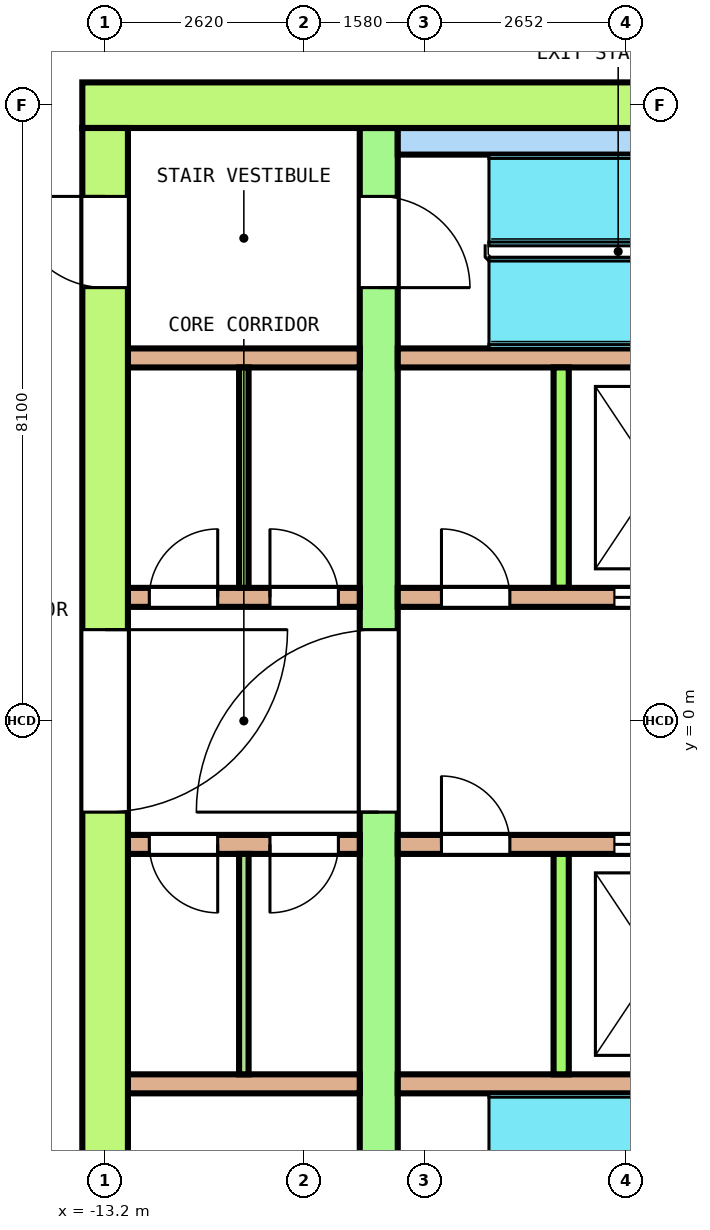
"""IFC4 building model, lengths in metres.
Left out: names, types, materials, properties, quantities, classifications, styles, units other than length and angle.
Written with IfcOpenShell. Run it as: python <this file> out.ifc"""

import sys

from ifc_helpers import new_model, si_unit, direction, frame, frame_2d, origin, place, context, subcontext, project, spatial, polyline, rectangle, outline, extrude, element, fill, save


model = new_model("IFC4")
c1 = context("Model", 3, precision=1e-05, world=origin(), true_north=direction((0.0, 1.0)))
c2 = subcontext(c1, "Body", "Model", "MODEL_VIEW")
j1 = project(units=[si_unit("LENGTHUNIT", "METRE"), si_unit("PLANEANGLEUNIT", "RADIAN")], contexts=[c1])
p1 = place(None, origin())
s1 = spatial("IfcSite", under=j1, at=p1, CompositionType="ELEMENT")
p2 = place(p1, origin())
s2 = spatial("IfcBuilding", under=s1, at=p2, CompositionType="ELEMENT")
p3 = place(p2, frame((0.0, 0.0, 227.4)))
s3 = spatial("IfcBuildingStorey", under=s2, at=p3, CompositionType="ELEMENT", Elevation=227.4)
p4 = place(p3, frame((-23.225, -2.573, 0.0), z_axis=(0.0, 0.0, 1.0), x_axis=(0.499986710104, -0.866033076574, 0.0)))
e1 = element("IfcWall", 1, at=p4, inside=s3, PredefinedType="SOLIDWALL", context=c2, shape_type="SweptSolid", body=[
    extrude(outline(polyline([(-0.027, -0.1), (1.019, -0.1), (2.064, -0.1), (3.11, -0.1), (4.156, -0.1), (5.201, -0.1), (6.247, -0.1), (7.292, -0.1), (8.338, -0.1), (9.384, -0.1), (10.429, -0.1), (11.475, -0.1), (12.52, -0.1), (13.566, -0.1), (14.612, -0.1), (15.657, -0.1), (16.703, -0.1), (17.748, -0.1), (18.794, -0.1), (18.74, 0.1), (17.701, 0.1), (16.661, 0.1), (15.621, 0.1), (14.582, 0.1), (13.542, 0.1), (12.502, 0.1), (11.463, 0.1), (10.423, 0.1), (9.384, 0.1), (8.344, 0.1), (7.304, 0.1), (6.265, 0.1), (5.225, 0.1), (4.185, 0.1), (3.146, 0.1), (2.106, 0.1), (1.066, 0.1), (0.027, 0.1), (-0.027, -0.1)])), origin(), (0.0, 0.0, 1.0), 3.7),
])
p5 = place(p4, frame((0.427, 0.0, 0.1)))
e2 = element("IfcOpeningElement", 2, at=p5, cuts=e1, PredefinedType="OPENING", context=c2, shape_type="SweptSolid", body=[
    extrude(rectangle(XDim=2.9, YDim=2.65, at=frame_2d((1.45, 1.325))), frame((0.0, 0.11, 0.0), z_axis=(0.0, -1.0, 0.0), x_axis=(1.0, 0.0, 0.0)), (0.0, 0.0, 1.0), 0.22),
])
p6 = place(p4, frame((4.18, 0.0, 0.1)))
e3 = element("IfcOpeningElement", 3, at=p6, cuts=e1, PredefinedType="OPENING", context=c2, shape_type="SweptSolid", body=[
    extrude(rectangle(XDim=2.9, YDim=2.65, at=frame_2d((1.45, 1.325))), frame((0.0, 0.11, 0.0), z_axis=(0.0, -1.0, 0.0), x_axis=(1.0, 0.0, 0.0)), (0.0, 0.0, 1.0), 0.22),
])
p7 = place(p4, frame((8.483, 0.0, 0.0)))
e4 = element("IfcOpeningElement", 4, at=p7, cuts=e1, PredefinedType="OPENING", context=c2, shape_type="SweptSolid", body=[
    extrude(rectangle(XDim=1.8, YDim=2.4, at=frame_2d((0.9, 1.2))), frame((0.0, 0.11, 0.0), z_axis=(0.0, -1.0, 0.0), x_axis=(1.0, 0.0, 0.0)), (0.0, 0.0, 1.0), 0.22),
])
p8 = place(p4, frame((8.483, 0.0, 2.55)))
e5 = element("IfcOpeningElement", 5, at=p8, cuts=e1, PredefinedType="OPENING", context=c2, shape_type="SweptSolid", body=[
    extrude(rectangle(XDim=1.8, YDim=0.2, at=frame_2d((0.9, 0.1))), frame((0.0, 0.11, 0.0), z_axis=(0.0, -1.0, 0.0), x_axis=(1.0, 0.0, 0.0)), (0.0, 0.0, 1.0), 0.22),
])
p9 = place(p4, frame((11.687, 0.0, 0.1)))
e6 = element("IfcOpeningElement", 6, at=p9, cuts=e1, PredefinedType="OPENING", context=c2, shape_type="SweptSolid", body=[
    extrude(rectangle(XDim=2.9, YDim=2.65, at=frame_2d((1.45, 1.325))), frame((0.0, 0.11, 0.0), z_axis=(0.0, -1.0, 0.0), x_axis=(1.0, 0.0, 0.0)), (0.0, 0.0, 1.0), 0.22),
])
p10 = place(p4, frame((15.44, 0.0, 0.1)))
e7 = element("IfcOpeningElement", 7, at=p10, cuts=e1, PredefinedType="OPENING", context=c2, shape_type="SweptSolid", body=[
    extrude(rectangle(XDim=2.9, YDim=2.65, at=frame_2d((1.45, 1.325))), frame((0.0, 0.11, 0.0), z_axis=(0.0, -1.0, 0.0), x_axis=(1.0, 0.0, 0.0)), (0.0, 0.0, 1.0), 0.22),
])
p11 = place(p3, frame((-13.5, 8.1, 0.0), z_axis=(0.0, 0.0, 1.0), x_axis=(1.0, 0.0, 0.0)))
e8 = element("IfcWall", 8, at=p11, inside=s3, PredefinedType="SHEAR", context=c2, shape_type="SweptSolid", body=[
    extrude(rectangle(XDim=27.0, YDim=0.6, at=frame_2d((13.5, 0.0))), origin(), (0.0, 0.0, 1.0), 3.7),
])
p12 = place(p11, frame((14.425, 0.0, 0.0)))
e9 = element("IfcOpeningElement", 9, at=p12, cuts=e8, PredefinedType="OPENING", context=c2, shape_type="SweptSolid", body=[
    extrude(rectangle(XDim=1.4, YDim=2.1, at=frame_2d((0.7, 1.05))), frame((0.0, 0.31, 0.0), z_axis=(0.0, -1.0, 0.0), x_axis=(1.0, 0.0, 0.0)), (0.0, 0.0, 1.0), 0.62),
])
p13 = place(p3, frame((-13.2, -7.8, 0.0), z_axis=(0.0, 0.0, 1.0), x_axis=(0.0, 1.0, 0.0)))
e10 = element("IfcWall", 10, at=p13, inside=s3, PredefinedType="SHEAR", context=c2, shape_type="SweptSolid", body=[
    extrude(rectangle(XDim=15.6, YDim=0.6, at=frame_2d((7.8, 0.0))), origin(), (0.0, 0.0, 1.0), 3.7),
])
p14 = place(p13, frame((6.6, 0.0, 0.0)))
e11 = element("IfcOpeningElement", 11, at=p14, cuts=e10, PredefinedType="OPENING", context=c2, shape_type="SweptSolid", body=[
    extrude(rectangle(XDim=2.4, YDim=2.1, at=frame_2d((1.2, 1.05))), frame((0.0, 0.31, 0.0), z_axis=(0.0, -1.0, 0.0), x_axis=(1.0, 0.0, 0.0)), (0.0, 0.0, 1.0), 0.62),
])
p15 = place(p13, frame((13.5, 0.0, 0.0)))
e12 = element("IfcOpeningElement", 12, at=p15, cuts=e10, PredefinedType="OPENING", context=c2, shape_type="SweptSolid", body=[
    extrude(rectangle(XDim=1.2, YDim=2.1, at=frame_2d((0.6, 1.05))), frame((0.0, 0.31, 0.0), z_axis=(0.0, -1.0, 0.0), x_axis=(1.0, 0.0, 0.0)), (0.0, 0.0, 1.0), 0.62),
])
p16 = place(p13, frame((0.9, 0.0, 0.0)))
e13 = element("IfcOpeningElement", 13, at=p16, cuts=e10, PredefinedType="OPENING", context=c2, shape_type="SweptSolid", body=[
    extrude(rectangle(XDim=1.2, YDim=2.1, at=frame_2d((0.6, 1.05))), frame((0.0, 0.31, 0.0), z_axis=(0.0, -1.0, 0.0), x_axis=(1.0, 0.0, 0.0)), (0.0, 0.0, 1.0), 0.62),
])
p17 = place(p3, frame((-9.6, -7.8, 0.0), z_axis=(0.0, 0.0, 1.0), x_axis=(0.0, 1.0, 0.0)))
e14 = element("IfcWall", 14, at=p17, inside=s3, PredefinedType="SHEAR", context=c2, shape_type="SweptSolid", body=[
    extrude(rectangle(XDim=15.6, YDim=0.5, at=frame_2d((7.8, 0.0))), origin(), (0.0, 0.0, 1.0), 3.7),
])
p18 = place(p17, frame((6.6, 0.0, 0.0)))
e15 = element("IfcOpeningElement", 15, at=p18, cuts=e14, PredefinedType="OPENING", context=c2, shape_type="SweptSolid", body=[
    extrude(rectangle(XDim=2.4, YDim=2.1, at=frame_2d((1.2, 1.05))), frame((0.0, 0.26, 0.0), z_axis=(0.0, -1.0, 0.0), x_axis=(1.0, 0.0, 0.0)), (0.0, 0.0, 1.0), 0.52),
])
p19 = place(p17, frame((13.5, 0.0, 0.0)))
e16 = element("IfcOpeningElement", 16, at=p19, cuts=e14, PredefinedType="OPENING", context=c2, shape_type="SweptSolid", body=[
    extrude(rectangle(XDim=1.2, YDim=2.1, at=frame_2d((0.6, 1.05))), frame((0.0, 0.26, 0.0), z_axis=(0.0, -1.0, 0.0), x_axis=(1.0, 0.0, 0.0)), (0.0, 0.0, 1.0), 0.52),
])
p20 = place(p17, frame((0.9, 0.0, 0.0)))
e17 = element("IfcOpeningElement", 17, at=p20, cuts=e14, PredefinedType="OPENING", context=c2, shape_type="SweptSolid", body=[
    extrude(rectangle(XDim=1.2, YDim=2.1, at=frame_2d((0.6, 1.05))), frame((0.0, 0.26, 0.0), z_axis=(0.0, -1.0, 0.0), x_axis=(1.0, 0.0, 0.0)), (0.0, 0.0, 1.0), 0.52),
])
p21 = place(p3, frame((-12.9, 1.625, 0.0), z_axis=(0.0, 0.0, 1.0), x_axis=(1.0, 0.0, 0.0)))
e18 = element("IfcWall", 18, at=p21, inside=s3, PredefinedType="SOLIDWALL", context=c2, shape_type="SweptSolid", body=[
    extrude(rectangle(XDim=3.05, YDim=0.25, at=frame_2d((1.525, 0.0))), origin(), (0.0, 0.0, 1.0), 3.7),
])
p22 = place(p21, frame((0.281, 0.0, 0.0)))
e19 = element("IfcOpeningElement", 19, at=p22, cuts=e18, PredefinedType="OPENING", context=c2, shape_type="SweptSolid", body=[
    extrude(rectangle(XDim=0.9, YDim=2.1, at=frame_2d((0.45, 1.05))), frame((0.0, 0.135, 0.0), z_axis=(0.0, -1.0, 0.0), x_axis=(1.0, 0.0, 0.0)), (0.0, 0.0, 1.0), 0.27),
])
p23 = place(p21, frame((1.869, 0.0, 0.0)))
e20 = element("IfcOpeningElement", 20, at=p23, cuts=e18, PredefinedType="OPENING", context=c2, shape_type="SweptSolid", body=[
    extrude(rectangle(XDim=0.9, YDim=2.1, at=frame_2d((0.45, 1.05))), frame((0.0, 0.135, 0.0), z_axis=(0.0, -1.0, 0.0), x_axis=(1.0, 0.0, 0.0)), (0.0, 0.0, 1.0), 0.27),
])
p24 = place(p3, frame((-9.35, 1.625, 0.0), z_axis=(0.0, 0.0, 1.0), x_axis=(1.0, 0.0, 0.0)))
e21 = element("IfcWall", 21, at=p24, inside=s3, PredefinedType="SOLIDWALL", context=c2, shape_type="SweptSolid", body=[
    extrude(rectangle(XDim=18.7, YDim=0.25, at=frame_2d((9.35, 0.0))), origin(), (0.0, 0.0, 1.0), 3.7),
])
p25 = place(p24, frame((2.85, 0.0, 0.0)))
e22 = element("IfcOpeningElement", 22, at=p25, cuts=e21, PredefinedType="OPENING", context=c2, shape_type="SweptSolid", body=[
    extrude(rectangle(XDim=1.1, YDim=2.1, at=frame_2d((0.55, 1.05))), frame((0.0, 0.135, 0.0), z_axis=(0.0, -1.0, 0.0), x_axis=(1.0, 0.0, 0.0)), (0.0, 0.0, 1.0), 0.27),
])
p26 = place(p24, frame((5.15, 0.0, 0.0)))
e23 = element("IfcOpeningElement", 23, at=p26, cuts=e21, PredefinedType="OPENING", context=c2, shape_type="SweptSolid", body=[
    extrude(rectangle(XDim=1.1, YDim=2.1, at=frame_2d((0.55, 1.05))), frame((0.0, 0.135, 0.0), z_axis=(0.0, -1.0, 0.0), x_axis=(1.0, 0.0, 0.0)), (0.0, 0.0, 1.0), 0.27),
])
p27 = place(p24, frame((14.8, 0.0, 0.0)))
e24 = element("IfcOpeningElement", 24, at=p27, cuts=e21, PredefinedType="OPENING", context=c2, shape_type="SweptSolid", body=[
    extrude(rectangle(XDim=1.1, YDim=2.1, at=frame_2d((0.55, 1.05))), frame((0.0, 0.135, 0.0), z_axis=(0.0, -1.0, 0.0), x_axis=(1.0, 0.0, 0.0)), (0.0, 0.0, 1.0), 0.27),
])
p28 = place(p24, frame((0.575, 0.0, 0.0)))
e25 = element("IfcOpeningElement", 25, at=p28, cuts=e21, PredefinedType="OPENING", context=c2, shape_type="SweptSolid", body=[
    extrude(rectangle(XDim=0.9, YDim=2.1, at=frame_2d((0.45, 1.05))), frame((0.0, 0.135, 0.0), z_axis=(0.0, -1.0, 0.0), x_axis=(1.0, 0.0, 0.0)), (0.0, 0.0, 1.0), 0.27),
])
p29 = place(p24, frame((17.225, 0.0, 0.0)))
e26 = element("IfcOpeningElement", 26, at=p29, cuts=e21, PredefinedType="OPENING", context=c2, shape_type="SweptSolid", body=[
    extrude(rectangle(XDim=0.9, YDim=2.1, at=frame_2d((0.45, 1.05))), frame((0.0, 0.135, 0.0), z_axis=(0.0, -1.0, 0.0), x_axis=(1.0, 0.0, 0.0)), (0.0, 0.0, 1.0), 0.27),
])
p30 = place(p3, frame((-12.9, 4.775, 0.0), z_axis=(0.0, 0.0, 1.0), x_axis=(1.0, 0.0, 0.0)))
e27 = element("IfcWall", 27, at=p30, inside=s3, PredefinedType="SOLIDWALL", context=c2, shape_type="SweptSolid", body=[
    extrude(rectangle(XDim=3.05, YDim=0.25, at=frame_2d((1.525, 0.0))), origin(), (0.0, 0.0, 1.0), 3.7),
])
p31 = place(p3, frame((-9.35, 4.775, 0.0), z_axis=(0.0, 0.0, 1.0), x_axis=(1.0, 0.0, 0.0)))
e28 = element("IfcWall", 28, at=p31, inside=s3, PredefinedType="SOLIDWALL", context=c2, shape_type="SweptSolid", body=[
    extrude(rectangle(XDim=18.7, YDim=0.25, at=frame_2d((9.35, 0.0))), origin(), (0.0, 0.0, 1.0), 3.7),
])
p32 = place(p3, frame((-7.2, 1.75, 0.0), z_axis=(0.0, 0.0, 1.0), x_axis=(0.0, 1.0, 0.0)))
e29 = element("IfcWall", 29, at=p32, inside=s3, PredefinedType="SOLIDWALL", context=c2, shape_type="SweptSolid", body=[
    extrude(rectangle(XDim=2.9, YDim=0.2, at=frame_2d((1.45, 0.0))), origin(), (0.0, 0.0, 1.0), 3.7),
])
p33 = place(p3, frame((-12.9, -1.625, 0.0), z_axis=(0.0, 0.0, 1.0), x_axis=(1.0, 0.0, 0.0)))
e30 = element("IfcWall", 30, at=p33, inside=s3, PredefinedType="SOLIDWALL", context=c2, shape_type="SweptSolid", body=[
    extrude(rectangle(XDim=3.05, YDim=0.25, at=frame_2d((1.525, 0.0))), origin(), (0.0, 0.0, 1.0), 3.7),
])
p34 = place(p33, frame((0.281, 0.0, 0.0)))
e31 = element("IfcOpeningElement", 31, at=p34, cuts=e30, PredefinedType="OPENING", context=c2, shape_type="SweptSolid", body=[
    extrude(rectangle(XDim=0.9, YDim=2.1, at=frame_2d((0.45, 1.05))), frame((0.0, 0.135, 0.0), z_axis=(0.0, -1.0, 0.0), x_axis=(1.0, 0.0, 0.0)), (0.0, 0.0, 1.0), 0.27),
])
p35 = place(p33, frame((1.869, 0.0, 0.0)))
e32 = element("IfcOpeningElement", 32, at=p35, cuts=e30, PredefinedType="OPENING", context=c2, shape_type="SweptSolid", body=[
    extrude(rectangle(XDim=0.9, YDim=2.1, at=frame_2d((0.45, 1.05))), frame((0.0, 0.135, 0.0), z_axis=(0.0, -1.0, 0.0), x_axis=(1.0, 0.0, 0.0)), (0.0, 0.0, 1.0), 0.27),
])
p36 = place(p3, frame((-9.35, -1.625, 0.0), z_axis=(0.0, 0.0, 1.0), x_axis=(1.0, 0.0, 0.0)))
e33 = element("IfcWall", 33, at=p36, inside=s3, PredefinedType="SOLIDWALL", context=c2, shape_type="SweptSolid", body=[
    extrude(rectangle(XDim=18.7, YDim=0.25, at=frame_2d((9.35, 0.0))), origin(), (0.0, 0.0, 1.0), 3.7),
])
p37 = place(p36, frame((2.85, 0.0, 0.0)))
e34 = element("IfcOpeningElement", 34, at=p37, cuts=e33, PredefinedType="OPENING", context=c2, shape_type="SweptSolid", body=[
    extrude(rectangle(XDim=1.1, YDim=2.1, at=frame_2d((0.55, 1.05))), frame((0.0, 0.135, 0.0), z_axis=(0.0, -1.0, 0.0), x_axis=(1.0, 0.0, 0.0)), (0.0, 0.0, 1.0), 0.27),
])
p38 = place(p36, frame((5.15, 0.0, 0.0)))
e35 = element("IfcOpeningElement", 35, at=p38, cuts=e33, PredefinedType="OPENING", context=c2, shape_type="SweptSolid", body=[
    extrude(rectangle(XDim=1.1, YDim=2.1, at=frame_2d((0.55, 1.05))), frame((0.0, 0.135, 0.0), z_axis=(0.0, -1.0, 0.0), x_axis=(1.0, 0.0, 0.0)), (0.0, 0.0, 1.0), 0.27),
])
p39 = place(p36, frame((14.8, 0.0, 0.0)))
e36 = element("IfcOpeningElement", 36, at=p39, cuts=e33, PredefinedType="OPENING", context=c2, shape_type="SweptSolid", body=[
    extrude(rectangle(XDim=1.1, YDim=2.1, at=frame_2d((0.55, 1.05))), frame((0.0, 0.135, 0.0), z_axis=(0.0, -1.0, 0.0), x_axis=(1.0, 0.0, 0.0)), (0.0, 0.0, 1.0), 0.27),
])
p40 = place(p36, frame((0.575, 0.0, 0.0)))
e37 = element("IfcOpeningElement", 37, at=p40, cuts=e33, PredefinedType="OPENING", context=c2, shape_type="SweptSolid", body=[
    extrude(rectangle(XDim=0.9, YDim=2.1, at=frame_2d((0.45, 1.05))), frame((0.0, 0.135, 0.0), z_axis=(0.0, -1.0, 0.0), x_axis=(1.0, 0.0, 0.0)), (0.0, 0.0, 1.0), 0.27),
])
p41 = place(p36, frame((17.225, 0.0, 0.0)))
e38 = element("IfcOpeningElement", 38, at=p41, cuts=e33, PredefinedType="OPENING", context=c2, shape_type="SweptSolid", body=[
    extrude(rectangle(XDim=0.9, YDim=2.1, at=frame_2d((0.45, 1.05))), frame((0.0, 0.135, 0.0), z_axis=(0.0, -1.0, 0.0), x_axis=(1.0, 0.0, 0.0)), (0.0, 0.0, 1.0), 0.27),
])
p42 = place(p3, frame((-12.9, -4.775, 0.0), z_axis=(0.0, 0.0, 1.0), x_axis=(1.0, 0.0, 0.0)))
e39 = element("IfcWall", 39, at=p42, inside=s3, PredefinedType="SOLIDWALL", context=c2, shape_type="SweptSolid", body=[
    extrude(rectangle(XDim=3.05, YDim=0.25, at=frame_2d((1.525, 0.0))), origin(), (0.0, 0.0, 1.0), 3.7),
])
p43 = place(p3, frame((-9.35, -4.775, 0.0), z_axis=(0.0, 0.0, 1.0), x_axis=(1.0, 0.0, 0.0)))
e40 = element("IfcWall", 40, at=p43, inside=s3, PredefinedType="SOLIDWALL", context=c2, shape_type="SweptSolid", body=[
    extrude(rectangle(XDim=18.7, YDim=0.25, at=frame_2d((9.35, 0.0))), origin(), (0.0, 0.0, 1.0), 3.7),
])
p44 = place(p3, frame((-7.2, -4.65, 0.0), z_axis=(0.0, 0.0, 1.0), x_axis=(0.0, 1.0, 0.0)))
e41 = element("IfcWall", 41, at=p44, inside=s3, PredefinedType="SOLIDWALL", context=c2, shape_type="SweptSolid", body=[
    extrude(rectangle(XDim=2.9, YDim=0.2, at=frame_2d((1.45, 0.0))), origin(), (0.0, 0.0, 1.0), 3.7),
])
p45 = place(p3, frame((-9.35, 7.625, 0.0), z_axis=(0.0, 0.0, 1.0), x_axis=(1.0, 0.0, 0.0)))
e42 = element("IfcWall", 42, at=p45, inside=s3, PredefinedType="SOLIDWALL", context=c2, shape_type="SweptSolid", body=[
    extrude(rectangle(XDim=5.8, YDim=0.35, at=frame_2d((2.9, 0.0))), origin(), (0.0, 0.0, 1.0), 3.7),
])
for number, where, z_axis, x_axis in (
    (43, (-11.375, 1.75, 0.0), (0.0, 0.0, 1.0), (0.0, 1.0, 0.0)),
    (44, (-11.375, -4.65, 0.0), (0.0, 0.0, 1.0), (0.0, 1.0, 0.0)),
):
    element("IfcWall", number, at=place(p3, frame(where, z_axis=z_axis, x_axis=x_axis)), inside=s3, PredefinedType="PARTITIONING", context=c2, shape_type="SweptSolid", body=[
        extrude(rectangle(XDim=2.9, YDim=0.125, at=frame_2d((1.45, 0.0))), origin(), (0.0, 0.0, 1.0), 3.7),
    ])
p46 = place(p25, origin())
e45 = element("IfcDoor", 45, at=p46, inside=s3, OperationType="DOUBLE_DOOR_SLIDING", PredefinedType="DOOR", context=c2, shape_type="SweptSolid", body=[
    extrude(rectangle(XDim=1.1, YDim=2.1, at=frame_2d((0.55, 1.05))), frame((0.0, 0.075, 0.0), z_axis=(0.0, -1.0, 0.0), x_axis=(1.0, 0.0, 0.0)), (0.0, 0.0, 1.0), 0.15),
])
fill(e22, e45)
p47 = place(p37, origin())
e46 = element("IfcDoor", 46, at=p47, inside=s3, OperationType="DOUBLE_DOOR_SLIDING", PredefinedType="DOOR", context=c2, shape_type="SweptSolid", body=[
    extrude(rectangle(XDim=1.1, YDim=2.1, at=frame_2d((0.55, 1.05))), frame((0.0, 0.075, 0.0), z_axis=(0.0, -1.0, 0.0), x_axis=(1.0, 0.0, 0.0)), (0.0, 0.0, 1.0), 0.15),
])
fill(e34, e46)
p48 = place(p18, origin())
e47 = element("IfcDoor", 47, at=p48, inside=s3, OperationType="DOUBLE_DOOR_SINGLE_SWING", PredefinedType="DOOR", context=c2, shape_type="SweptSolid", body=[
    extrude(rectangle(XDim=2.4, YDim=2.1, at=frame_2d((1.2, 1.05))), frame((0.0, 0.2, 0.0), z_axis=(0.0, -1.0, 0.0), x_axis=(1.0, 0.0, 0.0)), (0.0, 0.0, 1.0), 0.4),
])
fill(e15, e47)
p49 = place(p14, origin())
e48 = element("IfcDoor", 48, at=p49, inside=s3, OperationType="DOUBLE_DOOR_SINGLE_SWING", PredefinedType="DOOR", context=c2, shape_type="SweptSolid", body=[
    extrude(rectangle(XDim=2.4, YDim=2.1, at=frame_2d((1.2, 1.05))), frame((0.0, 0.25, 0.0), z_axis=(0.0, -1.0, 0.0), x_axis=(1.0, 0.0, 0.0)), (0.0, 0.0, 1.0), 0.5),
])
fill(e11, e48)
p50 = place(p19, origin())
e49 = element("IfcDoor", 49, at=p50, inside=s3, OperationType="SINGLE_SWING_LEFT", PredefinedType="DOOR", context=c2, shape_type="SweptSolid", body=[
    extrude(rectangle(XDim=1.2, YDim=2.1, at=frame_2d((0.6, 1.05))), frame((0.0, 0.2, 0.0), z_axis=(0.0, -1.0, 0.0), x_axis=(1.0, 0.0, 0.0)), (0.0, 0.0, 1.0), 0.4),
])
fill(e16, e49)
p51 = place(p15, origin())
e50 = element("IfcDoor", 50, at=p51, inside=s3, OperationType="SINGLE_SWING_RIGHT", PredefinedType="DOOR", context=c2, shape_type="SweptSolid", body=[
    extrude(rectangle(XDim=1.2, YDim=2.1, at=frame_2d((0.6, 1.05))), frame((0.0, 0.25, 0.0), z_axis=(0.0, -1.0, 0.0), x_axis=(1.0, 0.0, 0.0)), (0.0, 0.0, 1.0), 0.5),
])
fill(e12, e50)
p52 = place(p22, origin())
e51 = element("IfcDoor", 51, at=p52, inside=s3, OperationType="SINGLE_SWING_RIGHT", PredefinedType="DOOR", context=c2, shape_type="SweptSolid", body=[
    extrude(rectangle(XDim=0.9, YDim=2.1, at=frame_2d((0.45, 1.05))), frame((0.0, 0.075, 0.0), z_axis=(0.0, -1.0, 0.0), x_axis=(1.0, 0.0, 0.0)), (0.0, 0.0, 1.0), 0.15),
])
fill(e19, e51)
p53 = place(p23, origin())
e52 = element("IfcDoor", 52, at=p53, inside=s3, OperationType="SINGLE_SWING_LEFT", PredefinedType="DOOR", context=c2, shape_type="SweptSolid", body=[
    extrude(rectangle(XDim=0.9, YDim=2.1, at=frame_2d((0.45, 1.05))), frame((0.0, 0.075, 0.0), z_axis=(0.0, -1.0, 0.0), x_axis=(1.0, 0.0, 0.0)), (0.0, 0.0, 1.0), 0.15),
])
fill(e20, e52)
p54 = place(p28, origin())
e53 = element("IfcDoor", 53, at=p54, inside=s3, OperationType="SINGLE_SWING_RIGHT", PredefinedType="DOOR", context=c2, shape_type="SweptSolid", body=[
    extrude(rectangle(XDim=0.9, YDim=2.1, at=frame_2d((0.45, 1.05))), frame((0.0, 0.075, 0.0), z_axis=(0.0, -1.0, 0.0), x_axis=(1.0, 0.0, 0.0)), (0.0, 0.0, 1.0), 0.15),
])
fill(e25, e53)
p55 = place(p34, origin())
e54 = element("IfcDoor", 54, at=p55, inside=s3, OperationType="SINGLE_SWING_LEFT", PredefinedType="DOOR", context=c2, shape_type="SweptSolid", body=[
    extrude(rectangle(XDim=0.9, YDim=2.1, at=frame_2d((0.45, 1.05))), frame((0.0, 0.075, 0.0), z_axis=(0.0, -1.0, 0.0), x_axis=(1.0, 0.0, 0.0)), (0.0, 0.0, 1.0), 0.15),
])
fill(e31, e54)
p56 = place(p35, origin())
e55 = element("IfcDoor", 55, at=p56, inside=s3, OperationType="SINGLE_SWING_RIGHT", PredefinedType="DOOR", context=c2, shape_type="SweptSolid", body=[
    extrude(rectangle(XDim=0.9, YDim=2.1, at=frame_2d((0.45, 1.05))), frame((0.0, 0.075, 0.0), z_axis=(0.0, -1.0, 0.0), x_axis=(1.0, 0.0, 0.0)), (0.0, 0.0, 1.0), 0.15),
])
fill(e32, e55)
p57 = place(p40, origin())
e56 = element("IfcDoor", 56, at=p57, inside=s3, OperationType="SINGLE_SWING_LEFT", PredefinedType="DOOR", context=c2, shape_type="SweptSolid", body=[
    extrude(rectangle(XDim=0.9, YDim=2.1, at=frame_2d((0.45, 1.05))), frame((0.0, 0.075, 0.0), z_axis=(0.0, -1.0, 0.0), x_axis=(1.0, 0.0, 0.0)), (0.0, 0.0, 1.0), 0.15),
])
fill(e37, e56)
save(model, sys.argv[1])
